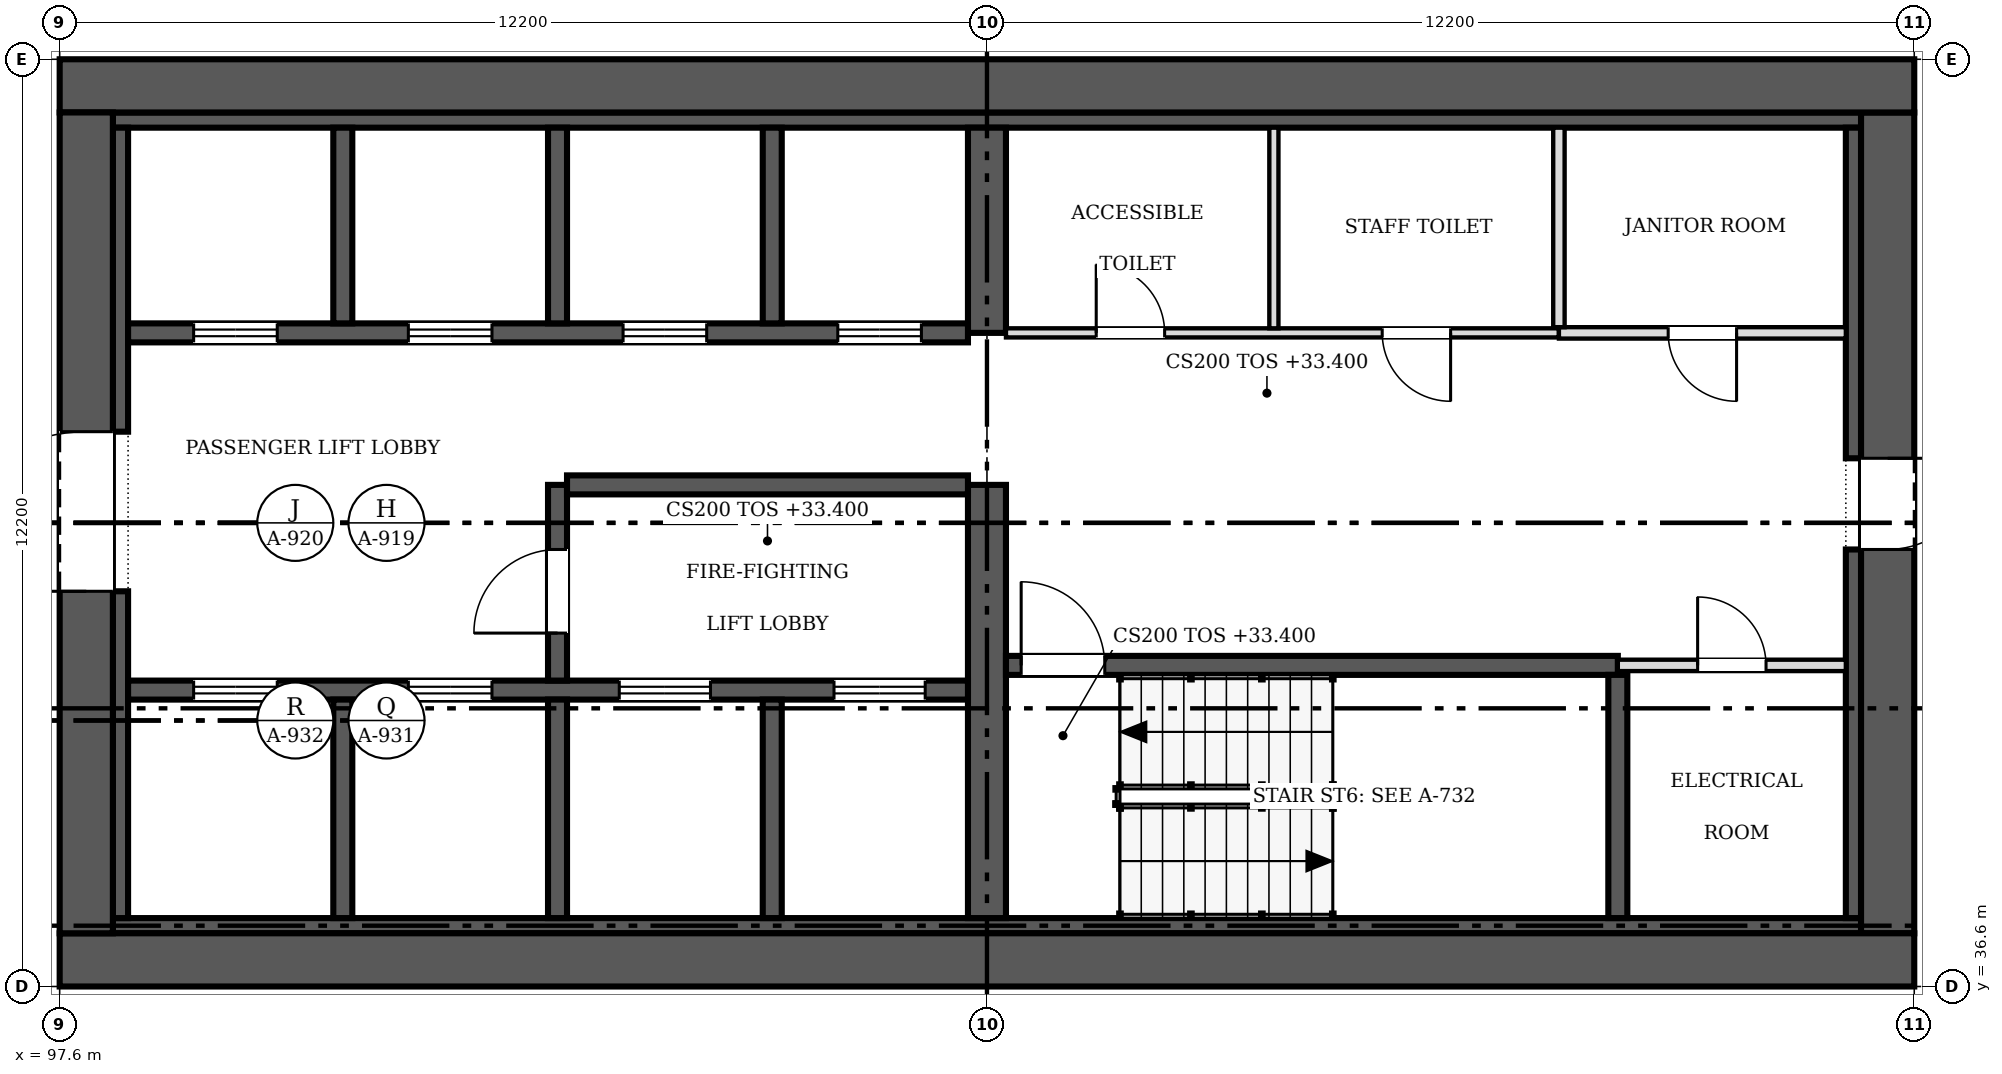
"""IFC4 building model, lengths in metres.
Left out: names, types, materials, properties, quantities, classifications, styles, units other than length and angle.
Written with IfcOpenShell. Run it as: python <this file> out.ifc"""

import sys

from ifc_helpers import new_model, si_unit, direction, frame, frame_2d, origin, place, context, subcontext, project, spatial, rectangle, extrude, source, transform, mapped, element, fill, save


model = new_model("IFC4")
c1 = context("Model", 3, precision=1e-05, world=origin(), true_north=direction((0.0, 1.0)))
c2 = subcontext(c1, "Body", "Model", "MODEL_VIEW")
j1 = project(units=[si_unit("LENGTHUNIT", "METRE"), si_unit("PLANEANGLEUNIT", "RADIAN")], contexts=[c1])
p1 = place(None, origin())
s1 = spatial("IfcSite", under=j1, at=p1, CompositionType="ELEMENT")
p2 = place(p1, origin())
s2 = spatial("IfcBuilding", under=s1, at=p2, CompositionType="ELEMENT")
p3 = place(p2, frame((0.0, 0.0, 33.4)))
s3 = spatial("IfcBuildingStorey", under=s2, at=p3, CompositionType="ELEMENT", Elevation=33.4)
p4 = place(p3, frame((122.0, 36.95, 0.0), z_axis=(0.0, 0.0, 1.0), x_axis=(-1.0, 0.0, 0.0)))
e1 = element("IfcWall", 1, at=p4, inside=s3, PredefinedType="SHEAR", context=c2, shape_type="SweptSolid", body=[
    extrude(rectangle(XDim=24.4, YDim=0.7, at=frame_2d((12.2, 0.0))), origin(), (0.0, 0.0, 1.0), 3.8),
])
p5 = place(p3, frame((97.95, 37.3, 0.0), z_axis=(0.0, 0.0, 1.0), x_axis=(0.0, 1.0, 0.0)))
e2 = element("IfcWall", 2, at=p5, inside=s3, PredefinedType="SHEAR", context=c2, shape_type="SweptSolid", body=[
    extrude(rectangle(XDim=10.8, YDim=0.7, at=frame_2d((5.4, 0.0))), origin(), (0.0, 0.0, 1.0), 3.8),
])
m1 = source(origin(), c2, "Body", "SweptSolid", [
    extrude(rectangle(XDim=2.1, YDim=2.4, at=frame_2d((1.05, 1.2))), frame((0.0, 0.36, 0.0), z_axis=(0.0, -1.0, 0.0), x_axis=(1.0, 0.0, 0.0)), (0.0, 0.0, 1.0), 0.72),
])
p6 = place(p5, frame((4.5, 0.0, 0.0)))
e3 = element("IfcOpeningElement", 3, at=p6, cuts=e2, PredefinedType="OPENING", context=c2, shape_type="MappedRepresentation", body=[
    mapped(m1, transform((0.0, 0.0, 0.0), scale=1.0)),
])
p7 = place(p3, frame((97.6, 48.45, 0.0), z_axis=(0.0, 0.0, 1.0), x_axis=(1.0, 0.0, 0.0)))
e4 = element("IfcWall", 4, at=p7, inside=s3, PredefinedType="SHEAR", context=c2, shape_type="SweptSolid", body=[
    extrude(rectangle(XDim=24.4, YDim=0.7, at=frame_2d((12.2, 0.0))), origin(), (0.0, 0.0, 1.0), 3.8),
])
p8 = place(p3, frame((121.65, 48.1, 0.0), z_axis=(0.0, 0.0, 1.0), x_axis=(0.0, -1.0, 0.0)))
e5 = element("IfcWall", 5, at=p8, inside=s3, PredefinedType="SHEAR", context=c2, shape_type="SweptSolid", body=[
    extrude(rectangle(XDim=10.8, YDim=0.7, at=frame_2d((5.4, 0.0))), origin(), (0.0, 0.0, 1.0), 3.8),
])
m2 = source(origin(), c2, "Body", "SweptSolid", [
    extrude(rectangle(XDim=1.2, YDim=2.1, at=frame_2d((0.6, 1.05))), frame((0.0, 0.36, 0.0), z_axis=(0.0, -1.0, 0.0), x_axis=(1.0, 0.0, 0.0)), (0.0, 0.0, 1.0), 0.72),
])
p9 = place(p8, frame((4.55, 0.0, 0.0)))
e6 = element("IfcOpeningElement", 6, at=p9, cuts=e5, PredefinedType="OPENING", context=c2, shape_type="MappedRepresentation", body=[
    mapped(m2, transform((0.0, 0.0, 0.0), scale=1.0)),
])
for number, where, z_axis, x_axis in (
    (7, (98.3, 37.4, 0.0), (0.0, 0.0, 1.0), (1.0, 0.0, 0.0)),
    (8, (98.3, 48.0, 0.0), (0.0, 0.0, 1.0), (1.0, 0.0, 0.0)),
):
    element("IfcWall", number, at=place(p3, frame(where, z_axis=z_axis, x_axis=x_axis)), inside=s3, PredefinedType="SOLIDWALL", context=c2, shape_type="SweptSolid", body=[
        extrude(rectangle(XDim=23.0, YDim=0.2, at=frame_2d((11.5, 0.0))), origin(), (0.0, 0.0, 1.0), 3.8),
    ])
p10 = place(p3, frame((98.4, 37.5, 0.0), z_axis=(0.0, 0.0, 1.0), x_axis=(0.0, 1.0, 0.0)))
e9 = element("IfcWall", 9, at=p10, inside=s3, PredefinedType="SOLIDWALL", context=c2, shape_type="SweptSolid", body=[
    extrude(rectangle(XDim=4.3, YDim=0.2, at=frame_2d((2.15, 0.0))), origin(), (0.0, 0.0, 1.0), 3.8),
])
p11 = place(p3, frame((98.4, 43.9, 0.0), z_axis=(0.0, 0.0, 1.0), x_axis=(0.0, 1.0, 0.0)))
e10 = element("IfcWall", 10, at=p11, inside=s3, PredefinedType="SOLIDWALL", context=c2, shape_type="SweptSolid", body=[
    extrude(rectangle(XDim=4.0, YDim=0.2, at=frame_2d((2.0, 0.0))), origin(), (0.0, 0.0, 1.0), 3.8),
])
p12 = place(p3, frame((121.2, 37.5, 0.0), z_axis=(0.0, 0.0, 1.0), x_axis=(0.0, 1.0, 0.0)))
e11 = element("IfcWall", 11, at=p12, inside=s3, PredefinedType="SOLIDWALL", context=c2, shape_type="SweptSolid", body=[
    extrude(rectangle(XDim=4.85, YDim=0.2, at=frame_2d((2.425, 0.0))), origin(), (0.0, 0.0, 1.0), 3.8),
])
p13 = place(p3, frame((121.2, 43.55, 0.0), z_axis=(0.0, 0.0, 1.0), x_axis=(0.0, 1.0, 0.0)))
e12 = element("IfcWall", 12, at=p13, inside=s3, PredefinedType="SOLIDWALL", context=c2, shape_type="SweptSolid", body=[
    extrude(rectangle(XDim=4.35, YDim=0.2, at=frame_2d((2.175, 0.0))), origin(), (0.0, 0.0, 1.0), 3.8),
])
p14 = place(p3, frame((109.8, 37.5, 0.0), z_axis=(0.0, 0.0, 1.0), x_axis=(0.0, 1.0, 0.0)))
e13 = element("IfcWall", 13, at=p14, inside=s3, PredefinedType="SHEAR", context=c2, shape_type="SweptSolid", body=[
    extrude(rectangle(XDim=5.7, YDim=0.5, at=frame_2d((2.85, 0.0))), origin(), (0.0, 0.0, 1.0), 3.8),
])
p15 = place(p3, frame((109.8, 45.2, 0.0), z_axis=(0.0, 0.0, 1.0), x_axis=(0.0, 1.0, 0.0)))
e14 = element("IfcWall", 14, at=p15, inside=s3, PredefinedType="SHEAR", context=c2, shape_type="SweptSolid", body=[
    extrude(rectangle(XDim=2.7, YDim=0.5, at=frame_2d((1.35, 0.0))), origin(), (0.0, 0.0, 1.0), 3.8),
])
p16 = place(p3, frame((98.5, 40.5, 0.0), z_axis=(0.0, 0.0, 1.0), x_axis=(1.0, 0.0, 0.0)))
e15 = element("IfcWall", 15, at=p16, inside=s3, PredefinedType="SOLIDWALL", context=c2, shape_type="SweptSolid", body=[
    extrude(rectangle(XDim=11.05, YDim=0.25, at=frame_2d((5.525, 0.0))), origin(), (0.0, 0.0, 1.0), 3.8),
])
m3 = source(origin(), c2, "Body", "SweptSolid", [
    extrude(rectangle(XDim=1.1, YDim=2.1, at=frame_2d((0.55, 1.05))), frame((0.0, 0.135, 0.0), z_axis=(0.0, -1.0, 0.0), x_axis=(1.0, 0.0, 0.0)), (0.0, 0.0, 1.0), 0.27),
])
p17 = place(p16, frame((0.863, 0.0, 0.0)))
e16 = element("IfcOpeningElement", 16, at=p17, cuts=e15, PredefinedType="OPENING", context=c2, shape_type="MappedRepresentation", body=[
    mapped(m3, transform((0.0, 0.0, 0.0), scale=1.0)),
])
p18 = place(p16, frame((3.688, 0.0, 0.0)))
e17 = element("IfcOpeningElement", 17, at=p18, cuts=e15, PredefinedType="OPENING", context=c2, shape_type="MappedRepresentation", body=[
    mapped(m3, transform((0.0, 0.0, 0.0), scale=1.0)),
])
m4 = source(origin(), c2, "Body", "SweptSolid", [
    extrude(rectangle(XDim=1.2, YDim=2.1, at=frame_2d((0.6, 1.05))), frame((0.0, 0.135, 0.0), z_axis=(0.0, -1.0, 0.0), x_axis=(1.0, 0.0, 0.0)), (0.0, 0.0, 1.0), 0.27),
])
p19 = place(p16, frame((6.462, 0.0, 0.0)))
e18 = element("IfcOpeningElement", 18, at=p19, cuts=e15, PredefinedType="OPENING", context=c2, shape_type="MappedRepresentation", body=[
    mapped(m4, transform((0.0, 0.0, 0.0), scale=1.0)),
])
p20 = place(p16, frame((9.288, 0.0, 0.0)))
e19 = element("IfcOpeningElement", 19, at=p20, cuts=e15, PredefinedType="OPENING", context=c2, shape_type="MappedRepresentation", body=[
    mapped(m4, transform((0.0, 0.0, 0.0), scale=1.0)),
])
p21 = place(p3, frame((109.55, 45.2, 0.0), z_axis=(0.0, 0.0, 1.0), x_axis=(-1.0, 0.0, 0.0)))
e20 = element("IfcWall", 20, at=p21, inside=s3, PredefinedType="SOLIDWALL", context=c2, shape_type="SweptSolid", body=[
    extrude(rectangle(XDim=11.05, YDim=0.25, at=frame_2d((5.525, 0.0))), origin(), (0.0, 0.0, 1.0), 3.8),
])
p22 = place(p21, frame((9.087, 0.0, 0.0)))
e21 = element("IfcOpeningElement", 21, at=p22, cuts=e20, PredefinedType="OPENING", context=c2, shape_type="MappedRepresentation", body=[
    mapped(m3, transform((0.0, 0.0, 0.0), scale=1.0)),
])
p23 = place(p21, frame((6.262, 0.0, 0.0)))
e22 = element("IfcOpeningElement", 22, at=p23, cuts=e20, PredefinedType="OPENING", context=c2, shape_type="MappedRepresentation", body=[
    mapped(m3, transform((0.0, 0.0, 0.0), scale=1.0)),
])
p24 = place(p21, frame((3.438, 0.0, 0.0)))
e23 = element("IfcOpeningElement", 23, at=p24, cuts=e20, PredefinedType="OPENING", context=c2, shape_type="MappedRepresentation", body=[
    mapped(m3, transform((0.0, 0.0, 0.0), scale=1.0)),
])
p25 = place(p21, frame((0.613, 0.0, 0.0)))
e24 = element("IfcOpeningElement", 24, at=p25, cuts=e20, PredefinedType="OPENING", context=c2, shape_type="MappedRepresentation", body=[
    mapped(m3, transform((0.0, 0.0, 0.0), scale=1.0)),
])
p26 = place(p3, frame((118.1, 40.825, 0.0), z_axis=(0.0, 0.0, 1.0), x_axis=(-1.0, 0.0, 0.0)))
e25 = element("IfcWall", 25, at=p26, inside=s3, PredefinedType="SOLIDWALL", context=c2, shape_type="SweptSolid", body=[
    extrude(rectangle(XDim=8.05, YDim=0.25, at=frame_2d((4.025, 0.0))), origin(), (0.0, 0.0, 1.0), 3.8),
])
p27 = place(p26, frame((6.75, 0.0, 0.0)))
e26 = element("IfcOpeningElement", 26, at=p27, cuts=e25, PredefinedType="OPENING", context=c2, shape_type="MappedRepresentation", body=[
    mapped(m3, transform((0.0, 0.0, 0.0), scale=1.0)),
])
p28 = place(p3, frame((104.15, 37.5, 0.0), z_axis=(0.0, 0.0, 1.0), x_axis=(0.0, 1.0, 0.0)))
e27 = element("IfcWall", 27, at=p28, inside=s3, PredefinedType="SOLIDWALL", context=c2, shape_type="SweptSolid", body=[
    extrude(rectangle(XDim=2.875, YDim=0.25, at=frame_2d((1.438, 0.0))), origin(), (0.0, 0.0, 1.0), 3.8),
])
p29 = place(p3, frame((104.15, 43.2, 0.0), z_axis=(0.0, 0.0, 1.0), x_axis=(0.0, -1.0, 0.0)))
e28 = element("IfcWall", 28, at=p29, inside=s3, PredefinedType="SOLIDWALL", context=c2, shape_type="SweptSolid", body=[
    extrude(rectangle(XDim=2.575, YDim=0.25, at=frame_2d((1.288, 0.0))), origin(), (0.0, 0.0, 1.0), 3.8),
])
p30 = place(p29, frame((0.85, 0.0, 0.0)))
e29 = element("IfcOpeningElement", 29, at=p30, cuts=e28, PredefinedType="OPENING", context=c2, shape_type="MappedRepresentation", body=[
    mapped(m3, transform((0.0, 0.0, 0.0), scale=1.0)),
])
p31 = place(p3, frame((104.275, 43.2, 0.0), z_axis=(0.0, 0.0, 1.0), x_axis=(1.0, 0.0, 0.0)))
e30 = element("IfcWall", 30, at=p31, inside=s3, PredefinedType="SOLIDWALL", context=c2, shape_type="SweptSolid", body=[
    extrude(rectangle(XDim=5.275, YDim=0.25, at=frame_2d((2.638, 0.0))), origin(), (0.0, 0.0, 1.0), 3.8),
])
p32 = place(p3, frame((118.1, 37.5, 0.0), z_axis=(0.0, 0.0, 1.0), x_axis=(0.0, 1.0, 0.0)))
e31 = element("IfcWall", 31, at=p32, inside=s3, PredefinedType="SOLIDWALL", context=c2, shape_type="SweptSolid", body=[
    extrude(rectangle(XDim=3.2, YDim=0.25, at=frame_2d((1.6, 0.0))), origin(), (0.0, 0.0, 1.0), 3.8),
])
for number, where, z_axis, x_axis in (
    (32, (101.325, 37.5, 0.0), (0.0, 0.0, 1.0), (0.0, 1.0, 0.0)),
    (33, (106.975, 37.5, 0.0), (0.0, 0.0, 1.0), (0.0, 1.0, 0.0)),
):
    element("IfcWall", number, at=place(p3, frame(where, z_axis=z_axis, x_axis=x_axis)), inside=s3, PredefinedType="SOLIDWALL", context=c2, shape_type="SweptSolid", body=[
        extrude(rectangle(XDim=2.875, YDim=0.25, at=frame_2d((1.438, 0.0))), origin(), (0.0, 0.0, 1.0), 3.8),
    ])
for number, where, z_axis, x_axis in (
    (34, (101.325, 45.325, 0.0), (0.0, 0.0, 1.0), (0.0, 1.0, 0.0)),
    (35, (104.15, 45.325, 0.0), (0.0, 0.0, 1.0), (0.0, 1.0, 0.0)),
    (36, (106.975, 45.325, 0.0), (0.0, 0.0, 1.0), (0.0, 1.0, 0.0)),
):
    element("IfcWall", number, at=place(p3, frame(where, z_axis=z_axis, x_axis=x_axis)), inside=s3, PredefinedType="SOLIDWALL", context=c2, shape_type="SweptSolid", body=[
        extrude(rectangle(XDim=2.575, YDim=0.25, at=frame_2d((1.288, 0.0))), origin(), (0.0, 0.0, 1.0), 3.8),
    ])
p33 = place(p3, frame((110.05, 45.2, 0.0), z_axis=(0.0, 0.0, 1.0), x_axis=(1.0, 0.0, 0.0)))
e37 = element("IfcWall", 37, at=p33, inside=s3, PredefinedType="PARTITIONING", context=c2, shape_type="SweptSolid", body=[
    extrude(rectangle(XDim=7.275, YDim=0.12, at=frame_2d((3.637, 0.0))), origin(), (0.0, 0.0, 1.0), 3.6),
])
m5 = source(origin(), c2, "Body", "SweptSolid", [
    extrude(rectangle(XDim=0.9, YDim=2.1, at=frame_2d((0.45, 1.05))), frame((0.0, 0.07, 0.0), z_axis=(0.0, -1.0, 0.0), x_axis=(1.0, 0.0, 0.0)), (0.0, 0.0, 1.0), 0.14),
])
p34 = place(p33, frame((1.188, 0.0, 0.0)))
e38 = element("IfcOpeningElement", 38, at=p34, cuts=e37, PredefinedType="OPENING", context=c2, shape_type="MappedRepresentation", body=[
    mapped(m5, transform((0.0, 0.0, 0.0), scale=1.0)),
])
p35 = place(p33, frame((4.95, 0.0, 0.0)))
e39 = element("IfcOpeningElement", 39, at=p35, cuts=e37, PredefinedType="OPENING", context=c2, shape_type="MappedRepresentation", body=[
    mapped(m5, transform((0.0, 0.0, 0.0), scale=1.0)),
])
p36 = place(p3, frame((117.325, 45.2, 0.0), z_axis=(0.0, 0.0, 1.0), x_axis=(1.0, 0.0, 0.0)))
e40 = element("IfcWall", 40, at=p36, inside=s3, PredefinedType="PARTITIONING", context=c2, shape_type="SweptSolid", body=[
    extrude(rectangle(XDim=3.775, YDim=0.15, at=frame_2d((1.888, 0.0))), origin(), (0.0, 0.0, 1.0), 3.6),
])
m6 = source(origin(), c2, "Body", "SweptSolid", [
    extrude(rectangle(XDim=0.9, YDim=2.1, at=frame_2d((0.45, 1.05))), frame((0.0, 0.085, 0.0), z_axis=(0.0, -1.0, 0.0), x_axis=(1.0, 0.0, 0.0)), (0.0, 0.0, 1.0), 0.17),
])
p37 = place(p36, frame((1.438, 0.0, 0.0)))
e41 = element("IfcOpeningElement", 41, at=p37, cuts=e40, PredefinedType="OPENING", context=c2, shape_type="MappedRepresentation", body=[
    mapped(m6, transform((0.0, 0.0, 0.0), scale=1.0)),
])
p38 = place(p3, frame((121.1, 40.825, 0.0), z_axis=(0.0, 0.0, 1.0), x_axis=(-1.0, 0.0, 0.0)))
e42 = element("IfcWall", 42, at=p38, inside=s3, PredefinedType="PARTITIONING", context=c2, shape_type="SweptSolid", body=[
    extrude(rectangle(XDim=3.0, YDim=0.15, at=frame_2d((1.5, 0.0))), origin(), (0.0, 0.0, 1.0), 3.6),
])
p39 = place(p38, frame((1.05, 0.0, 0.0)))
e43 = element("IfcOpeningElement", 43, at=p39, cuts=e42, PredefinedType="OPENING", context=c2, shape_type="MappedRepresentation", body=[
    mapped(m6, transform((0.0, 0.0, 0.0), scale=1.0)),
])
p40 = place(p3, frame((113.575, 45.26, 0.0), z_axis=(0.0, 0.0, 1.0), x_axis=(0.0, 1.0, 0.0)))
e44 = element("IfcWall", 44, at=p40, inside=s3, PredefinedType="PARTITIONING", context=c2, shape_type="SweptSolid", body=[
    extrude(rectangle(XDim=2.64, YDim=0.12, at=frame_2d((1.32, 0.0))), origin(), (0.0, 0.0, 1.0), 3.6),
])
p41 = place(p3, frame((117.325, 45.275, 0.0), z_axis=(0.0, 0.0, 1.0), x_axis=(0.0, 1.0, 0.0)))
e45 = element("IfcWall", 45, at=p41, inside=s3, PredefinedType="PARTITIONING", context=c2, shape_type="SweptSolid", body=[
    extrude(rectangle(XDim=2.625, YDim=0.15, at=frame_2d((1.312, 0.0))), origin(), (0.0, 0.0, 1.0), 3.6),
])
m7 = source(origin(), c2, "Body", "SweptSolid", [
    extrude(rectangle(XDim=2.1, YDim=2.4, at=frame_2d((1.05, 1.2))), frame((0.0, 0.025, 0.0), z_axis=(0.0, -1.0, 0.0), x_axis=(1.0, 0.0, 0.0)), (0.0, 0.0, 1.0), 0.05),
])
p42 = place(p6, origin())
e46 = element("IfcDoor", 46, at=p42, inside=s3, OperationType="DOUBLE_DOOR_SINGLE_SWING", PredefinedType="DOOR", context=c2, shape_type="MappedRepresentation", body=[
    mapped(m7, transform((0.0, 0.0, 0.0), scale=1.0)),
])
fill(e3, e46)
m8 = source(origin(), c2, "Body", "SweptSolid", [
    extrude(rectangle(XDim=1.2, YDim=2.1, at=frame_2d((0.6, 1.05))), frame((0.0, 0.025, 0.0), z_axis=(0.0, -1.0, 0.0), x_axis=(1.0, 0.0, 0.0)), (0.0, 0.0, 1.0), 0.05),
])
p43 = place(p9, origin())
e47 = element("IfcDoor", 47, at=p43, inside=s3, OperationType="SINGLE_SWING_LEFT", PredefinedType="DOOR", context=c2, shape_type="MappedRepresentation", body=[
    mapped(m8, transform((0.0, 0.0, 0.0), scale=1.0)),
])
fill(e6, e47)
m9 = source(origin(), c2, "Body", "SweptSolid", [
    extrude(rectangle(XDim=1.1, YDim=2.1, at=frame_2d((0.55, 1.05))), frame((0.0, 0.025, 0.0), z_axis=(0.0, -1.0, 0.0), x_axis=(1.0, 0.0, 0.0)), (0.0, 0.0, 1.0), 0.05),
])
p44 = place(p17, origin())
e48 = element("IfcDoor", 48, at=p44, inside=s3, OperationType="DOUBLE_DOOR_SLIDING", PredefinedType="DOOR", context=c2, shape_type="MappedRepresentation", body=[
    mapped(m9, transform((0.0, 0.0, 0.0), scale=1.0)),
])
fill(e16, e48)
p45 = place(p18, origin())
e49 = element("IfcDoor", 49, at=p45, inside=s3, OperationType="DOUBLE_DOOR_SLIDING", PredefinedType="DOOR", context=c2, shape_type="MappedRepresentation", body=[
    mapped(m9, transform((0.0, 0.0, 0.0), scale=1.0)),
])
fill(e17, e49)
p46 = place(p19, origin())
e50 = element("IfcDoor", 50, at=p46, inside=s3, OperationType="DOUBLE_DOOR_SLIDING", PredefinedType="DOOR", context=c2, shape_type="MappedRepresentation", body=[
    mapped(m8, transform((0.0, 0.0, 0.0), scale=1.0)),
])
fill(e18, e50)
p47 = place(p20, origin())
e51 = element("IfcDoor", 51, at=p47, inside=s3, OperationType="DOUBLE_DOOR_SLIDING", PredefinedType="DOOR", context=c2, shape_type="MappedRepresentation", body=[
    mapped(m8, transform((0.0, 0.0, 0.0), scale=1.0)),
])
fill(e19, e51)
p48 = place(p22, origin())
e52 = element("IfcDoor", 52, at=p48, inside=s3, OperationType="DOUBLE_DOOR_SLIDING", PredefinedType="DOOR", context=c2, shape_type="MappedRepresentation", body=[
    mapped(m9, transform((0.0, 0.0, 0.0), scale=1.0)),
])
fill(e21, e52)
p49 = place(p23, origin())
e53 = element("IfcDoor", 53, at=p49, inside=s3, OperationType="DOUBLE_DOOR_SLIDING", PredefinedType="DOOR", context=c2, shape_type="MappedRepresentation", body=[
    mapped(m9, transform((0.0, 0.0, 0.0), scale=1.0)),
])
fill(e22, e53)
p50 = place(p24, origin())
e54 = element("IfcDoor", 54, at=p50, inside=s3, OperationType="DOUBLE_DOOR_SLIDING", PredefinedType="DOOR", context=c2, shape_type="MappedRepresentation", body=[
    mapped(m9, transform((0.0, 0.0, 0.0), scale=1.0)),
])
fill(e23, e54)
p51 = place(p25, origin())
e55 = element("IfcDoor", 55, at=p51, inside=s3, OperationType="DOUBLE_DOOR_SLIDING", PredefinedType="DOOR", context=c2, shape_type="MappedRepresentation", body=[
    mapped(m9, transform((0.0, 0.0, 0.0), scale=1.0)),
])
fill(e24, e55)
p52 = place(p27, origin())
e56 = element("IfcDoor", 56, at=p52, inside=s3, OperationType="SINGLE_SWING_RIGHT", PredefinedType="DOOR", context=c2, shape_type="MappedRepresentation", body=[
    mapped(m9, transform((0.0, 0.0, 0.0), scale=1.0)),
])
fill(e26, e56)
p53 = place(p30, origin())
e57 = element("IfcDoor", 57, at=p53, inside=s3, OperationType="SINGLE_SWING_RIGHT", PredefinedType="DOOR", context=c2, shape_type="MappedRepresentation", body=[
    mapped(m9, transform((0.0, 0.0, 0.0), scale=1.0)),
])
fill(e29, e57)
m10 = source(origin(), c2, "Body", "SweptSolid", [
    extrude(rectangle(XDim=0.9, YDim=2.1, at=frame_2d((0.45, 1.05))), frame((0.0, 0.025, 0.0), z_axis=(0.0, -1.0, 0.0), x_axis=(1.0, 0.0, 0.0)), (0.0, 0.0, 1.0), 0.05),
])
p54 = place(p34, origin())
e58 = element("IfcDoor", 58, at=p54, inside=s3, OperationType="SINGLE_SWING_LEFT", PredefinedType="DOOR", context=c2, shape_type="MappedRepresentation", body=[
    mapped(m10, transform((0.0, 0.0, 0.0), scale=1.0)),
])
fill(e38, e58)
p55 = place(p35, origin())
e59 = element("IfcDoor", 59, at=p55, inside=s3, OperationType="SINGLE_SWING_RIGHT", PredefinedType="DOOR", context=c2, shape_type="MappedRepresentation", body=[
    mapped(m10, transform((0.0, 0.0, 0.0), scale=1.0)),
])
fill(e39, e59)
p56 = place(p37, origin())
e60 = element("IfcDoor", 60, at=p56, inside=s3, OperationType="SINGLE_SWING_RIGHT", PredefinedType="DOOR", context=c2, shape_type="MappedRepresentation", body=[
    mapped(m10, transform((0.0, 0.0, 0.0), scale=1.0)),
])
fill(e41, e60)
p57 = place(p39, origin())
e61 = element("IfcDoor", 61, at=p57, inside=s3, OperationType="SINGLE_SWING_RIGHT", PredefinedType="DOOR", context=c2, shape_type="MappedRepresentation", body=[
    mapped(m10, transform((0.0, 0.0, 0.0), scale=1.0)),
])
fill(e43, e61)
save(model, sys.argv[1])
